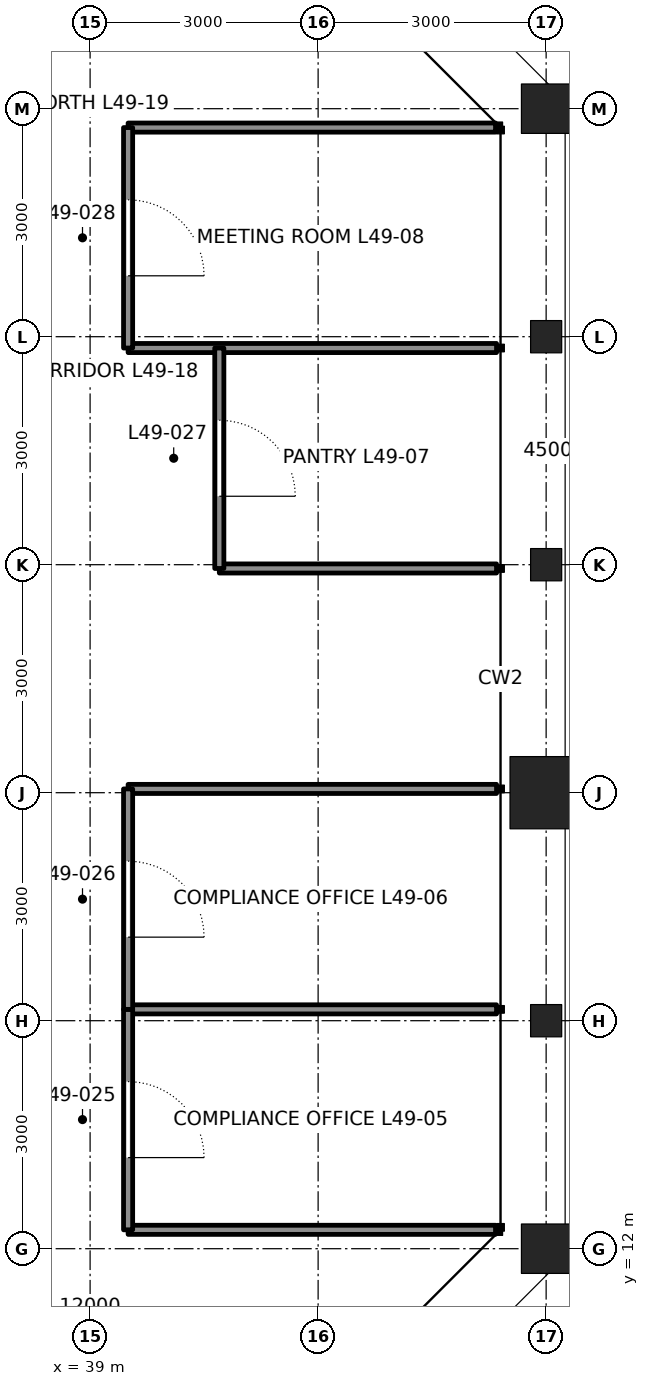
"""IFC4 building model, lengths in metres.
Left out: names, types, materials, properties, quantities, classifications, styles, units other than length and angle.
Written with IfcOpenShell. Run it as: python <this file> out.ifc"""

import sys

from ifc_helpers import new_model, si_unit, direction, frame, frame_2d, origin, origin_2d, place, context, subcontext, project, spatial, rectangle, hollow_rectangle, i_section, extrude, element, fill, save


model = new_model("IFC4")
c1 = context("Model", 3, precision=1e-05, world=origin(), true_north=direction((0.0, 1.0)))
c2 = subcontext(c1, "Body", "Model", "MODEL_VIEW")
j1 = project(units=[si_unit("LENGTHUNIT", "METRE"), si_unit("PLANEANGLEUNIT", "RADIAN")], contexts=[c1])
p1 = place(None, origin())
s1 = spatial("IfcSite", under=j1, at=p1, CompositionType="ELEMENT")
p2 = place(p1, origin())
s2 = spatial("IfcBuilding", under=s1, at=p2, CompositionType="ELEMENT")
p3 = place(p2, frame((0.0, 0.0, 222.3)))
s3 = spatial("IfcBuildingStorey", under=s2, at=p3, CompositionType="ELEMENT", Elevation=222.3)
p4 = place(p3, frame((45.0, 12.0, 0.0), z_axis=(0.0, 0.0, 1.0), x_axis=(1.0, 0.0, 0.0)))
e1 = element("IfcColumn", 1, at=p4, inside=s3, PredefinedType="COLUMN", context=c2, shape_type="SweptSolid", body=[
    extrude(hollow_rectangle(XDim=0.65, YDim=0.65, WallThickness=0.065, at=origin_2d()), origin(), (0.0, 0.0, 1.0), 4.2),
])
p5 = place(p3, frame((45.0, 15.0, 0.0), z_axis=(0.0, 0.0, 1.0), x_axis=(1.0, 0.0, 0.0)))
e2 = element("IfcColumn", 2, at=p5, inside=s3, PredefinedType="COLUMN", context=c2, shape_type="SweptSolid", body=[
    extrude(i_section(OverallWidth=0.409, OverallDepth=0.424, WebThickness=0.033, FlangeThickness=0.052, at=origin_2d()), origin(), (0.0, 0.0, 1.0), 4.2),
])
p6 = place(p3, frame((45.0, 18.0, 0.0), z_axis=(0.0, 0.0, 1.0), x_axis=(1.0, 0.0, 0.0)))
e3 = element("IfcColumn", 3, at=p6, inside=s3, PredefinedType="COLUMN", context=c2, shape_type="SweptSolid", body=[
    extrude(hollow_rectangle(XDim=0.95, YDim=0.95, WallThickness=0.11, at=origin_2d()), origin(), (0.0, 0.0, 1.0), 4.2),
])
for number, where, z_axis, x_axis in (
    (4, (45.0, 21.0, 0.0), (0.0, 0.0, 1.0), (1.0, 0.0, 0.0)),
    (5, (45.0, 24.0, 0.0), (0.0, 0.0, 1.0), (1.0, 0.0, 0.0)),
):
    element("IfcColumn", number, at=place(p3, frame(where, z_axis=z_axis, x_axis=x_axis)), inside=s3, PredefinedType="COLUMN", context=c2, shape_type="SweptSolid", body=[
        extrude(i_section(OverallWidth=0.409, OverallDepth=0.424, WebThickness=0.033, FlangeThickness=0.052, at=origin_2d()), origin(), (0.0, 0.0, 1.0), 4.2),
    ])
p7 = place(p3, frame((45.0, 27.0, 0.0), z_axis=(0.0, 0.0, 1.0), x_axis=(1.0, 0.0, 0.0)))
e6 = element("IfcColumn", 6, at=p7, inside=s3, PredefinedType="COLUMN", context=c2, shape_type="SweptSolid", body=[
    extrude(hollow_rectangle(XDim=0.65, YDim=0.65, WallThickness=0.065, at=origin_2d()), origin(), (0.0, 0.0, 1.0), 4.2),
])
p8 = place(p3, frame((44.334, 12.249, 0.0), z_axis=(0.0, 0.0, 1.0), x_axis=(-1.0, 0.0, 0.0)))
e7 = element("IfcWall", 7, at=p8, inside=s3, PredefinedType="PARTITIONING", context=c2, shape_type="SweptSolid", body=[
    extrude(rectangle(XDim=4.834, YDim=0.12, at=frame_2d((2.417, 0.0))), origin(), (0.0, 0.0, 1.0), 4.04),
])
p9 = place(p3, frame((44.347, 15.149, 0.0), z_axis=(0.0, 0.0, 1.0), x_axis=(-1.0, 0.0, 0.0)))
e8 = element("IfcWall", 8, at=p9, inside=s3, PredefinedType="PARTITIONING", context=c2, shape_type="SweptSolid", body=[
    extrude(rectangle(XDim=4.847, YDim=0.12, at=frame_2d((2.424, 0.0))), origin(), (0.0, 0.0, 1.0), 4.04),
])
p10 = place(p3, frame((44.347, 18.05, 0.0), z_axis=(0.0, 0.0, 1.0), x_axis=(-1.0, 0.0, 0.0)))
e9 = element("IfcWall", 9, at=p10, inside=s3, PredefinedType="PARTITIONING", context=c2, shape_type="SweptSolid", body=[
    extrude(rectangle(XDim=4.847, YDim=0.12, at=frame_2d((2.424, 0.0))), origin(), (0.0, 0.0, 1.0), 3.357),
])
p11 = place(p3, frame((44.347, 20.95, 0.0), z_axis=(0.0, 0.0, 1.0), x_axis=(-1.0, 0.0, 0.0)))
e10 = element("IfcWall", 10, at=p11, inside=s3, PredefinedType="PARTITIONING", context=c2, shape_type="SweptSolid", body=[
    extrude(rectangle(XDim=3.647, YDim=0.12, at=frame_2d((1.824, 0.0))), origin(), (0.0, 0.0, 1.0), 3.357),
])
p12 = place(p3, frame((44.347, 23.851, 0.0), z_axis=(0.0, 0.0, 1.0), x_axis=(-1.0, 0.0, 0.0)))
e11 = element("IfcWall", 11, at=p12, inside=s3, PredefinedType="PARTITIONING", context=c2, shape_type="SweptSolid", body=[
    extrude(rectangle(XDim=4.847, YDim=0.12, at=frame_2d((2.424, 0.0))), origin(), (0.0, 0.0, 1.0), 4.04),
])
p13 = place(p3, frame((44.334, 26.751, 0.0), z_axis=(0.0, 0.0, 1.0), x_axis=(-1.0, 0.0, 0.0)))
e12 = element("IfcWall", 12, at=p13, inside=s3, PredefinedType="PARTITIONING", context=c2, shape_type="SweptSolid", body=[
    extrude(rectangle(XDim=4.834, YDim=0.12, at=frame_2d((2.417, 0.0))), origin(), (0.0, 0.0, 1.0), 4.04),
])
p14 = place(p3, frame((39.5, 12.249, 0.0), z_axis=(0.0, 0.0, 1.0), x_axis=(0.0, 1.0, 0.0)))
e13 = element("IfcWall", 13, at=p14, inside=s3, PredefinedType="PARTITIONING", context=c2, shape_type="SweptSolid", body=[
    extrude(rectangle(XDim=2.901, YDim=0.12, at=frame_2d((1.45, 0.0))), origin(), (0.0, 0.0, 1.0), 4.04),
])
p15 = place(p14, frame((0.95, 0.0, 0.0)))
e14 = element("IfcOpeningElement", 14, at=p15, cuts=e13, PredefinedType="OPENING", context=c2, shape_type="SweptSolid", body=[
    extrude(rectangle(XDim=1.0, YDim=2.4, at=frame_2d((0.5, 1.2))), frame((0.0, 0.07, 0.0), z_axis=(0.0, -1.0, 0.0), x_axis=(1.0, 0.0, 0.0)), (0.0, 0.0, 1.0), 0.14),
])
p16 = place(p3, frame((39.5, 15.149, 0.0), z_axis=(0.0, 0.0, 1.0), x_axis=(0.0, 1.0, 0.0)))
e15 = element("IfcWall", 15, at=p16, inside=s3, PredefinedType="PARTITIONING", context=c2, shape_type="SweptSolid", body=[
    extrude(rectangle(XDim=2.901, YDim=0.12, at=frame_2d((1.45, 0.0))), origin(), (0.0, 0.0, 1.0), 4.04),
])
p17 = place(p16, frame((0.95, 0.0, 0.0)))
e16 = element("IfcOpeningElement", 16, at=p17, cuts=e15, PredefinedType="OPENING", context=c2, shape_type="SweptSolid", body=[
    extrude(rectangle(XDim=1.0, YDim=2.4, at=frame_2d((0.5, 1.2))), frame((0.0, 0.07, 0.0), z_axis=(0.0, -1.0, 0.0), x_axis=(1.0, 0.0, 0.0)), (0.0, 0.0, 1.0), 0.14),
])
p18 = place(p3, frame((40.7, 20.95, 0.0), z_axis=(0.0, 0.0, 1.0), x_axis=(0.0, 1.0, 0.0)))
e17 = element("IfcWall", 17, at=p18, inside=s3, PredefinedType="PARTITIONING", context=c2, shape_type="SweptSolid", body=[
    extrude(rectangle(XDim=2.901, YDim=0.12, at=frame_2d((1.45, 0.0))), origin(), (0.0, 0.0, 1.0), 4.04),
])
p19 = place(p18, frame((0.95, 0.0, 0.0)))
e18 = element("IfcOpeningElement", 18, at=p19, cuts=e17, PredefinedType="OPENING", context=c2, shape_type="SweptSolid", body=[
    extrude(rectangle(XDim=1.0, YDim=2.4, at=frame_2d((0.5, 1.2))), frame((0.0, 0.07, 0.0), z_axis=(0.0, -1.0, 0.0), x_axis=(1.0, 0.0, 0.0)), (0.0, 0.0, 1.0), 0.14),
])
p20 = place(p3, frame((39.5, 23.851, 0.0), z_axis=(0.0, 0.0, 1.0), x_axis=(0.0, 1.0, 0.0)))
e19 = element("IfcWall", 19, at=p20, inside=s3, PredefinedType="PARTITIONING", context=c2, shape_type="SweptSolid", body=[
    extrude(rectangle(XDim=2.901, YDim=0.12, at=frame_2d((1.45, 0.0))), origin(), (0.0, 0.0, 1.0), 4.04),
])
p21 = place(p20, frame((0.95, 0.0, 0.0)))
e20 = element("IfcOpeningElement", 20, at=p21, cuts=e19, PredefinedType="OPENING", context=c2, shape_type="SweptSolid", body=[
    extrude(rectangle(XDim=1.0, YDim=2.4, at=frame_2d((0.5, 1.2))), frame((0.0, 0.07, 0.0), z_axis=(0.0, -1.0, 0.0), x_axis=(1.0, 0.0, 0.0)), (0.0, 0.0, 1.0), 0.14),
])
p22 = place(p3, frame((36.0, 12.0, 0.0), z_axis=(0.0, 0.0, 1.0), x_axis=(0.707106781187, -0.707106781187, 0.0)))
e21 = element("IfcWall", 21, at=p22, inside=s3, PredefinedType="PARTITIONING", context=c2, shape_type="SweptSolid", body=[
    extrude(rectangle(XDim=5.732, YDim=0.12, at=frame_2d((2.866, 0.0))), origin(), (0.0, 0.0, 1.0), 4.04),
])
p23 = place(p22, frame((1.3, 0.0, 0.0)))
e22 = element("IfcOpeningElement", 22, at=p23, cuts=e21, PredefinedType="OPENING", context=c2, shape_type="SweptSolid", body=[
    extrude(rectangle(XDim=1.0, YDim=2.4, at=frame_2d((0.5, 1.2))), frame((0.0, 0.07, 0.0), z_axis=(0.0, -1.0, 0.0), x_axis=(1.0, 0.0, 0.0)), (0.0, 0.0, 1.0), 0.14),
])
p24 = place(p15, frame((1.0, 0.0, 0.0), z_axis=(0.0, 0.0, 1.0), x_axis=(-1.0, 0.0, 0.0)))
e23 = element("IfcDoor", 23, at=p24, inside=s3, OperationType="SINGLE_SWING_RIGHT", PredefinedType="DOOR", context=c2, shape_type="SweptSolid", body=[
    extrude(rectangle(XDim=1.0, YDim=2.4, at=frame_2d((0.5, 1.2))), frame((0.0, 0.025, 0.0), z_axis=(0.0, -1.0, 0.0), x_axis=(1.0, 0.0, 0.0)), (0.0, 0.0, 1.0), 0.05),
])
fill(e14, e23)
p25 = place(p17, frame((1.0, 0.0, 0.0), z_axis=(0.0, 0.0, 1.0), x_axis=(-1.0, 0.0, 0.0)))
e24 = element("IfcDoor", 24, at=p25, inside=s3, OperationType="SINGLE_SWING_RIGHT", PredefinedType="DOOR", context=c2, shape_type="SweptSolid", body=[
    extrude(rectangle(XDim=1.0, YDim=2.4, at=frame_2d((0.5, 1.2))), frame((0.0, 0.025, 0.0), z_axis=(0.0, -1.0, 0.0), x_axis=(1.0, 0.0, 0.0)), (0.0, 0.0, 1.0), 0.05),
])
fill(e16, e24)
p26 = place(p19, frame((1.0, 0.0, 0.0), z_axis=(0.0, 0.0, 1.0), x_axis=(-1.0, 0.0, 0.0)))
e25 = element("IfcDoor", 25, at=p26, inside=s3, OperationType="SINGLE_SWING_RIGHT", PredefinedType="DOOR", context=c2, shape_type="SweptSolid", body=[
    extrude(rectangle(XDim=1.0, YDim=2.4, at=frame_2d((0.5, 1.2))), frame((0.0, 0.025, 0.0), z_axis=(0.0, -1.0, 0.0), x_axis=(1.0, 0.0, 0.0)), (0.0, 0.0, 1.0), 0.05),
])
fill(e18, e25)
p27 = place(p21, frame((1.0, 0.0, 0.0), z_axis=(0.0, 0.0, 1.0), x_axis=(-1.0, 0.0, 0.0)))
e26 = element("IfcDoor", 26, at=p27, inside=s3, OperationType="SINGLE_SWING_RIGHT", PredefinedType="DOOR", context=c2, shape_type="SweptSolid", body=[
    extrude(rectangle(XDim=1.0, YDim=2.4, at=frame_2d((0.5, 1.2))), frame((0.0, 0.025, 0.0), z_axis=(0.0, -1.0, 0.0), x_axis=(1.0, 0.0, 0.0)), (0.0, 0.0, 1.0), 0.05),
])
fill(e20, e26)
save(model, sys.argv[1])
